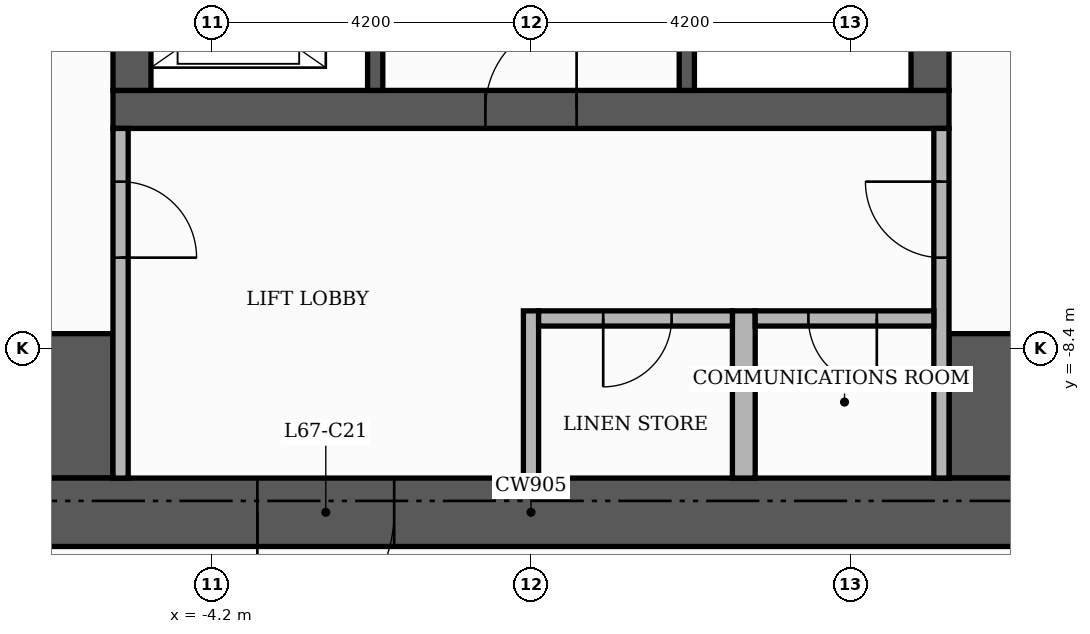
"""IFC4 building model, lengths in metres.
Left out: names, types, materials, properties, quantities, classifications, styles, units other than length and angle.
Written with IfcOpenShell. Run it as: python <this file> out.ifc"""

import sys

from ifc_helpers import new_model, si_unit, direction, frame, frame_2d, origin, place, context, subcontext, project, spatial, rectangle, extrude, element, fill, save


model = new_model("IFC4")
c1 = context("Model", 3, precision=1e-05, world=origin(), true_north=direction((0.0, 1.0)))
c2 = subcontext(c1, "Body", "Model", "MODEL_VIEW")
j1 = project(units=[si_unit("LENGTHUNIT", "METRE"), si_unit("PLANEANGLEUNIT", "RADIAN")], contexts=[c1])
p1 = place(None, origin())
s1 = spatial("IfcSite", under=j1, at=p1, CompositionType="ELEMENT")
p2 = place(p1, origin())
s2 = spatial("IfcBuilding", under=s1, at=p2, CompositionType="ELEMENT")
p3 = place(p2, frame((0.0, 0.0, 279.6)))
s3 = spatial("IfcBuildingStorey", under=s2, at=p3, CompositionType="ELEMENT", Elevation=279.6)
p4 = place(p3, frame((-5.5, -5.25, 0.0), z_axis=(0.0, 0.0, 1.0), x_axis=(1.0, 0.0, 0.0)))
e1 = element("IfcWall", 1, at=p4, inside=s3, PredefinedType="SHEAR", context=c2, shape_type="SweptSolid", body=[
    extrude(rectangle(XDim=11.0, YDim=0.5, at=frame_2d((5.5, 0.0))), origin(), (0.0, 0.0, 1.0), 3.48),
])
p5 = place(p4, frame((4.9, 0.0, 0.0)))
e2 = element("IfcOpeningElement", 2, at=p5, cuts=e1, PredefinedType="OPENING", context=c2, shape_type="SweptSolid", body=[
    extrude(rectangle(XDim=1.2, YDim=2.1, at=frame_2d((0.6, 1.05))), frame((0.0, 0.26, 0.0), z_axis=(0.0, -1.0, 0.0), x_axis=(1.0, 0.0, 0.0)), (0.0, 0.0, 1.0), 0.52),
])
for number, where, z_axis, x_axis in (
    (3, (-5.25, -5.0, 0.0), (0.0, 0.0, 1.0), (0.0, 1.0, 0.0)),
    (4, (5.25, -5.0, 0.0), (0.0, 0.0, 1.0), (0.0, 1.0, 0.0)),
):
    element("IfcWall", number, at=place(p3, frame(where, z_axis=z_axis, x_axis=x_axis)), inside=s3, PredefinedType="SHEAR", context=c2, shape_type="SweptSolid", body=[
        extrude(rectangle(XDim=10.5, YDim=0.5, at=frame_2d((5.25, 0.0))), origin(), (0.0, 0.0, 1.0), 3.48),
    ])
for number, where, z_axis, x_axis in (
    (5, (-10.1, -9.15, 0.0), (0.0, 0.0, 1.0), (1.0, 0.0, 0.0)),
    (6, (5.5, -9.15, 0.0), (0.0, 0.0, 1.0), (1.0, 0.0, 0.0)),
):
    element("IfcWall", number, at=place(p3, frame(where, z_axis=z_axis, x_axis=x_axis)), inside=s3, PredefinedType="SHEAR", context=c2, shape_type="SweptSolid", body=[
        extrude(rectangle(XDim=4.6, YDim=1.9, at=frame_2d((2.3, 0.0))), origin(), (0.0, 0.0, 1.0), 3.48),
    ])
p6 = place(p3, frame((2.05, -5.0, 0.0), z_axis=(0.0, 0.0, 1.0), x_axis=(0.0, 1.0, 0.0)))
e7 = element("IfcWall", 7, at=p6, inside=s3, PredefinedType="SHEAR", context=c2, shape_type="SweptSolid", body=[
    extrude(rectangle(XDim=6.6, YDim=0.2, at=frame_2d((3.3, 0.0))), origin(), (0.0, 0.0, 1.0), 3.48),
])
p7 = place(p6, frame((5.25, 0.0, 0.0)))
e8 = element("IfcOpeningElement", 8, at=p7, cuts=e7, PredefinedType="OPENING", context=c2, shape_type="SweptSolid", body=[
    extrude(rectangle(XDim=1.0, YDim=2.1, at=frame_2d((0.5, 1.05))), frame((0.0, 0.11, 0.0), z_axis=(0.0, -1.0, 0.0), x_axis=(1.0, 0.0, 0.0)), (0.0, 0.0, 1.0), 0.22),
])
p8 = place(p3, frame((-2.05, -5.0, 0.0), z_axis=(0.0, 0.0, 1.0), x_axis=(0.0, 1.0, 0.0)))
e9 = element("IfcWall", 9, at=p8, inside=s3, PredefinedType="SHEAR", context=c2, shape_type="SweptSolid", body=[
    extrude(rectangle(XDim=3.4, YDim=0.2, at=frame_2d((1.7, 0.0))), origin(), (0.0, 0.0, 1.0), 3.48),
])
p9 = place(p8, frame((0.55, 0.0, 0.0)))
e10 = element("IfcOpeningElement", 10, at=p9, cuts=e9, PredefinedType="OPENING", context=c2, shape_type="SweptSolid", body=[
    extrude(rectangle(XDim=1.1, YDim=2.1, at=frame_2d((0.55, 1.05))), frame((0.0, 0.11, 0.0), z_axis=(0.0, -1.0, 0.0), x_axis=(1.0, 0.0, 0.0)), (0.0, 0.0, 1.0), 0.22),
])
p10 = place(p8, frame((2.45, 0.0, 0.0)))
e11 = element("IfcOpeningElement", 11, at=p10, cuts=e9, PredefinedType="OPENING", context=c2, shape_type="SweptSolid", body=[
    extrude(rectangle(XDim=0.8, YDim=2.1, at=frame_2d((0.4, 1.05))), frame((0.0, 0.11, 0.0), z_axis=(0.0, -1.0, 0.0), x_axis=(1.0, 0.0, 0.0)), (0.0, 0.0, 1.0), 0.22),
])
p11 = place(p3, frame((-11.0, -10.55, 0.0), z_axis=(0.0, 0.0, 1.0), x_axis=(1.0, 0.0, 0.0)))
e12 = element("IfcWall", 12, at=p11, inside=s3, PredefinedType="SHEAR", context=c2, shape_type="SweptSolid", body=[
    extrude(rectangle(XDim=22.0, YDim=0.9, at=frame_2d((11.0, 0.0))), origin(), (0.0, 0.0, 1.0), 3.48),
])
p12 = place(p11, frame((7.4, 0.0, 0.0)))
e13 = element("IfcOpeningElement", 13, at=p12, cuts=e12, PredefinedType="OPENING", context=c2, shape_type="SweptSolid", body=[
    extrude(rectangle(XDim=1.8, YDim=2.2, at=frame_2d((0.9, 1.1))), frame((0.0, 0.46, 0.0), z_axis=(0.0, -1.0, 0.0), x_axis=(1.0, 0.0, 0.0)), (0.0, 0.0, 1.0), 0.92),
])
p13 = place(p3, frame((-5.4, -10.1, 0.0), z_axis=(0.0, 0.0, 1.0), x_axis=(0.0, 1.0, 0.0)))
e14 = element("IfcWall", 14, at=p13, inside=s3, PredefinedType="PARTITIONING", context=c2, shape_type="SweptSolid", body=[
    extrude(rectangle(XDim=4.6, YDim=0.2, at=frame_2d((2.3, 0.0))), origin(), (0.0, 0.0, 1.0), 3.48),
])
p14 = place(p13, frame((2.9, 0.0, 0.0)))
e15 = element("IfcOpeningElement", 15, at=p14, cuts=e14, PredefinedType="OPENING", context=c2, shape_type="SweptSolid", body=[
    extrude(rectangle(XDim=1.0, YDim=2.1, at=frame_2d((0.5, 1.05))), frame((0.0, 0.11, 0.0), z_axis=(0.0, -1.0, 0.0), x_axis=(1.0, 0.0, 0.0)), (0.0, 0.0, 1.0), 0.22),
])
p15 = place(p3, frame((0.0, -10.1, 0.0), z_axis=(0.0, 0.0, 1.0), x_axis=(0.0, 1.0, 0.0)))
e16 = element("IfcWall", 16, at=p15, inside=s3, PredefinedType="PARTITIONING", context=c2, shape_type="SweptSolid", body=[
    extrude(rectangle(XDim=2.2, YDim=0.2, at=frame_2d((1.1, 0.0))), origin(), (0.0, 0.0, 1.0), 3.48),
])
p16 = place(p3, frame((2.8, -10.1, 0.0), z_axis=(0.0, 0.0, 1.0), x_axis=(0.0, 1.0, 0.0)))
e17 = element("IfcWall", 17, at=p16, inside=s3, PredefinedType="PARTITIONING", context=c2, shape_type="SweptSolid", body=[
    extrude(rectangle(XDim=2.2, YDim=0.3, at=frame_2d((1.1, 0.0))), origin(), (0.0, 0.0, 1.0), 3.48),
])
p17 = place(p3, frame((5.4, -10.1, 0.0), z_axis=(0.0, 0.0, 1.0), x_axis=(0.0, 1.0, 0.0)))
e18 = element("IfcWall", 18, at=p17, inside=s3, PredefinedType="PARTITIONING", context=c2, shape_type="SweptSolid", body=[
    extrude(rectangle(XDim=4.6, YDim=0.2, at=frame_2d((2.3, 0.0))), origin(), (0.0, 0.0, 1.0), 3.48),
])
p18 = place(p17, frame((2.9, 0.0, 0.0)))
e19 = element("IfcOpeningElement", 19, at=p18, cuts=e18, PredefinedType="OPENING", context=c2, shape_type="SweptSolid", body=[
    extrude(rectangle(XDim=1.0, YDim=2.1, at=frame_2d((0.5, 1.05))), frame((0.0, 0.11, 0.0), z_axis=(0.0, -1.0, 0.0), x_axis=(1.0, 0.0, 0.0)), (0.0, 0.0, 1.0), 0.22),
])
p19 = place(p3, frame((0.1, -8.0, 0.0), z_axis=(0.0, 0.0, 1.0), x_axis=(1.0, 0.0, 0.0)))
e20 = element("IfcWall", 20, at=p19, inside=s3, PredefinedType="PARTITIONING", context=c2, shape_type="SweptSolid", body=[
    extrude(rectangle(XDim=2.55, YDim=0.2, at=frame_2d((1.275, 0.0))), origin(), (0.0, 0.0, 1.0), 3.48),
])
p20 = place(p19, frame((0.85, 0.0, 0.0)))
e21 = element("IfcOpeningElement", 21, at=p20, cuts=e20, PredefinedType="OPENING", context=c2, shape_type="SweptSolid", body=[
    extrude(rectangle(XDim=0.9, YDim=2.1, at=frame_2d((0.45, 1.05))), frame((0.0, 0.11, 0.0), z_axis=(0.0, -1.0, 0.0), x_axis=(1.0, 0.0, 0.0)), (0.0, 0.0, 1.0), 0.22),
])
p21 = place(p3, frame((2.95, -8.0, 0.0), z_axis=(0.0, 0.0, 1.0), x_axis=(1.0, 0.0, 0.0)))
e22 = element("IfcWall", 22, at=p21, inside=s3, PredefinedType="PARTITIONING", context=c2, shape_type="SweptSolid", body=[
    extrude(rectangle(XDim=2.35, YDim=0.2, at=frame_2d((1.175, 0.0))), origin(), (0.0, 0.0, 1.0), 3.48),
])
p22 = place(p21, frame((0.7, 0.0, 0.0)))
e23 = element("IfcOpeningElement", 23, at=p22, cuts=e22, PredefinedType="OPENING", context=c2, shape_type="SweptSolid", body=[
    extrude(rectangle(XDim=0.9, YDim=2.1, at=frame_2d((0.45, 1.05))), frame((0.0, 0.11, 0.0), z_axis=(0.0, -1.0, 0.0), x_axis=(1.0, 0.0, 0.0)), (0.0, 0.0, 1.0), 0.22),
])
p23 = place(p5, origin())
e24 = element("IfcDoor", 24, at=p23, inside=s3, OperationType="SINGLE_SWING_RIGHT", PredefinedType="DOOR", context=c2, shape_type="SweptSolid", body=[
    extrude(rectangle(XDim=1.2, YDim=2.1, at=frame_2d((0.6, 1.05))), frame((0.0, 0.025, 0.0), z_axis=(0.0, -1.0, 0.0), x_axis=(1.0, 0.0, 0.0)), (0.0, 0.0, 1.0), 0.05),
])
fill(e2, e24)
p24 = place(p14, frame((1.0, 0.0, 0.0), z_axis=(0.0, 0.0, 1.0), x_axis=(-1.0, 0.0, 0.0)))
e25 = element("IfcDoor", 25, at=p24, inside=s3, OperationType="SINGLE_SWING_LEFT", PredefinedType="DOOR", context=c2, shape_type="SweptSolid", body=[
    extrude(rectangle(XDim=1.0, YDim=2.1, at=frame_2d((0.5, 1.05))), frame((0.0, 0.025, 0.0), z_axis=(0.0, -1.0, 0.0), x_axis=(1.0, 0.0, 0.0)), (0.0, 0.0, 1.0), 0.05),
])
fill(e15, e25)
p25 = place(p18, origin())
e26 = element("IfcDoor", 26, at=p25, inside=s3, OperationType="SINGLE_SWING_RIGHT", PredefinedType="DOOR", context=c2, shape_type="SweptSolid", body=[
    extrude(rectangle(XDim=1.0, YDim=2.1, at=frame_2d((0.5, 1.05))), frame((0.0, 0.025, 0.0), z_axis=(0.0, -1.0, 0.0), x_axis=(1.0, 0.0, 0.0)), (0.0, 0.0, 1.0), 0.05),
])
fill(e19, e26)
p26 = place(p12, frame((1.8, 0.0, 0.0), z_axis=(0.0, 0.0, 1.0), x_axis=(-1.0, 0.0, 0.0)))
e27 = element("IfcDoor", 27, at=p26, inside=s3, OperationType="DOUBLE_DOOR_SINGLE_SWING", PredefinedType="DOOR", context=c2, shape_type="SweptSolid", body=[
    extrude(rectangle(XDim=1.8, YDim=2.2, at=frame_2d((0.9, 1.1))), frame((0.0, 0.025, 0.0), z_axis=(0.0, -1.0, 0.0), x_axis=(1.0, 0.0, 0.0)), (0.0, 0.0, 1.0), 0.05),
])
fill(e13, e27)
p27 = place(p20, frame((0.9, 0.0, 0.0), z_axis=(0.0, 0.0, 1.0), x_axis=(-1.0, 0.0, 0.0)))
e28 = element("IfcDoor", 28, at=p27, inside=s3, OperationType="SINGLE_SWING_LEFT", PredefinedType="DOOR", context=c2, shape_type="SweptSolid", body=[
    extrude(rectangle(XDim=0.9, YDim=2.1, at=frame_2d((0.45, 1.05))), frame((0.0, 0.025, 0.0), z_axis=(0.0, -1.0, 0.0), x_axis=(1.0, 0.0, 0.0)), (0.0, 0.0, 1.0), 0.05),
])
fill(e21, e28)
p28 = place(p22, frame((0.9, 0.0, 0.0), z_axis=(0.0, 0.0, 1.0), x_axis=(-1.0, 0.0, 0.0)))
e29 = element("IfcDoor", 29, at=p28, inside=s3, OperationType="SINGLE_SWING_RIGHT", PredefinedType="DOOR", context=c2, shape_type="SweptSolid", body=[
    extrude(rectangle(XDim=0.9, YDim=2.1, at=frame_2d((0.45, 1.05))), frame((0.0, 0.025, 0.0), z_axis=(0.0, -1.0, 0.0), x_axis=(1.0, 0.0, 0.0)), (0.0, 0.0, 1.0), 0.05),
])
fill(e23, e29)
save(model, sys.argv[1])
